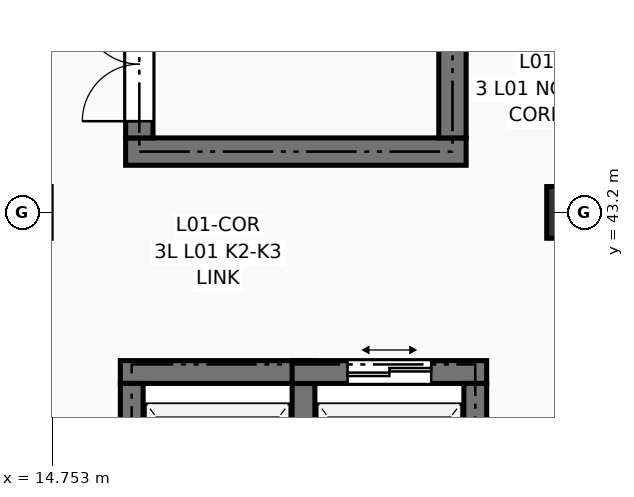
"""IFC4 building model, lengths in metres.
Left out: names, types, materials, properties, quantities, classifications, styles, units other than length and angle.
Written with IfcOpenShell. Run it as: python <this file> out.ifc"""

import sys

from ifc_helpers import new_model, si_unit, direction, frame, frame_2d, origin, origin_2d, place, context, subcontext, project, spatial, rectangle, extrude, element, fill, save


model = new_model("IFC4")
c1 = context("Model", 3, precision=1e-05, world=origin(), true_north=direction((0.0, 1.0)))
c2 = subcontext(c1, "Body", "Model", "MODEL_VIEW")
j1 = project(units=[si_unit("LENGTHUNIT", "METRE"), si_unit("PLANEANGLEUNIT", "RADIAN")], contexts=[c1])
p1 = place(None, origin())
s1 = spatial("IfcSite", under=j1, at=p1, CompositionType="ELEMENT")
p2 = place(p1, origin())
s2 = spatial("IfcBuilding", under=s1, at=p2, CompositionType="ELEMENT")
p3 = place(p2, frame((0.0, 0.0, 4.5)))
s3 = spatial("IfcBuildingStorey", under=s2, at=p3, CompositionType="ELEMENT", Elevation=4.5)
p4 = place(p3, frame((21.6, 43.2, 0.0), z_axis=(0.0, 0.0, 1.0), x_axis=(1.0, 0.0, 0.0)))
e1 = element("IfcColumn", 1, at=p4, inside=s3, PredefinedType="COLUMN", context=c2, shape_type="SweptSolid", body=[
    extrude(rectangle(XDim=0.68, YDim=0.68, at=origin_2d()), origin(), (0.0, 0.0, 1.0), 4.05),
])
p5 = place(p3, frame((15.72, 44.0, 0.0), z_axis=(0.0, 0.0, 1.0), x_axis=(1.0, 0.0, 0.0)))
e2 = element("IfcWall", 2, at=p5, inside=s3, PredefinedType="SHEAR", context=c2, shape_type="SweptSolid", body=[
    extrude(rectangle(XDim=4.48, YDim=0.36, at=frame_2d((2.24, 0.0))), origin(), (0.0, 0.0, 1.0), 3.79),
])
p6 = place(p3, frame((15.9, 44.18, 0.0), z_axis=(0.0, 0.0, 1.0), x_axis=(0.0, 1.0, 0.0)))
e3 = element("IfcWall", 3, at=p6, inside=s3, PredefinedType="SHEAR", context=c2, shape_type="SweptSolid", body=[
    extrude(rectangle(XDim=7.24, YDim=0.36, at=frame_2d((3.62, 0.0))), origin(), (0.0, 0.0, 1.0), 3.79),
])
p7 = place(p6, frame((0.22, 0.0, 0.0)))
e4 = element("IfcOpeningElement", 4, at=p7, cuts=e3, PredefinedType="OPENING", context=c2, shape_type="SweptSolid", body=[
    extrude(rectangle(XDim=1.5, YDim=2.2, at=frame_2d((0.75, 1.1))), frame((0.0, 0.192, 0.0), z_axis=(0.0, -1.0, 0.0), x_axis=(1.0, 0.0, 0.0)), (0.0, 0.0, 1.0), 0.384),
])
p8 = place(p3, frame((20.02, 44.18, 0.0), z_axis=(0.0, 0.0, 1.0), x_axis=(0.0, 1.0, 0.0)))
e5 = element("IfcWall", 5, at=p8, inside=s3, PredefinedType="SHEAR", context=c2, shape_type="SweptSolid", body=[
    extrude(rectangle(XDim=7.24, YDim=0.36, at=frame_2d((3.62, 0.0))), origin(), (0.0, 0.0, 1.0), 3.79),
])
p9 = place(p3, frame((15.65, 41.1, 0.0), z_axis=(0.0, 0.0, 1.0), x_axis=(1.0, 0.0, 0.0)))
e6 = element("IfcWall", 6, at=p9, inside=s3, PredefinedType="SHEAR", context=c2, shape_type="SweptSolid", body=[
    extrude(rectangle(XDim=2.56, YDim=0.3, at=frame_2d((1.28, 0.0))), origin(), (0.0, 0.0, 1.0), 3.79),
])
p10 = place(p3, frame((15.8, 37.98, 0.0), z_axis=(0.0, 0.0, 1.0), x_axis=(0.0, 1.0, 0.0)))
e7 = element("IfcWall", 7, at=p10, inside=s3, PredefinedType="SHEAR", context=c2, shape_type="SweptSolid", body=[
    extrude(rectangle(XDim=2.97, YDim=0.3, at=frame_2d((1.485, 0.0))), origin(), (0.0, 0.0, 1.0), 3.79),
])
p11 = place(p10, frame((0.935, 0.0, 0.0)))
e8 = element("IfcOpeningElement", 8, at=p11, cuts=e7, PredefinedType="OPENING", context=c2, shape_type="SweptSolid", body=[
    extrude(rectangle(XDim=1.1, YDim=2.2, at=frame_2d((0.55, 1.1))), frame((0.0, 0.162, 0.0), z_axis=(0.0, -1.0, 0.0), x_axis=(1.0, 0.0, 0.0)), (0.0, 0.0, 1.0), 0.324),
])
p12 = place(p3, frame((18.06, 37.98, 0.0), z_axis=(0.0, 0.0, 1.0), x_axis=(0.0, 1.0, 0.0)))
e9 = element("IfcWall", 9, at=p12, inside=s3, PredefinedType="SHEAR", context=c2, shape_type="SweptSolid", body=[
    extrude(rectangle(XDim=2.97, YDim=0.3, at=frame_2d((1.485, 0.0))), origin(), (0.0, 0.0, 1.0), 3.79),
])
p13 = place(p3, frame((17.91, 41.1, 0.0), z_axis=(0.0, 0.0, 1.0), x_axis=(1.0, 0.0, 0.0)))
e10 = element("IfcWall", 10, at=p13, inside=s3, PredefinedType="SHEAR", context=c2, shape_type="SweptSolid", body=[
    extrude(rectangle(XDim=2.56, YDim=0.3, at=frame_2d((1.28, 0.0))), origin(), (0.0, 0.0, 1.0), 3.79),
])
p14 = place(p13, frame((0.73, 0.0, 0.0)))
e11 = element("IfcOpeningElement", 11, at=p14, cuts=e10, PredefinedType="OPENING", context=c2, shape_type="SweptSolid", body=[
    extrude(rectangle(XDim=1.1, YDim=2.2, at=frame_2d((0.55, 1.1))), frame((0.0, 0.162, 0.0), z_axis=(0.0, -1.0, 0.0), x_axis=(1.0, 0.0, 0.0)), (0.0, 0.0, 1.0), 0.324),
])
p15 = place(p3, frame((20.32, 37.98, 0.0), z_axis=(0.0, 0.0, 1.0), x_axis=(0.0, 1.0, 0.0)))
e12 = element("IfcWall", 12, at=p15, inside=s3, PredefinedType="SHEAR", context=c2, shape_type="SweptSolid", body=[
    extrude(rectangle(XDim=2.97, YDim=0.3, at=frame_2d((1.485, 0.0))), origin(), (0.0, 0.0, 1.0), 3.79),
])
p16 = place(p7, origin())
e13 = element("IfcDoor", 13, at=p16, inside=s3, OperationType="DOUBLE_DOOR_SINGLE_SWING", PredefinedType="DOOR", context=c2, shape_type="SweptSolid", body=[
    extrude(rectangle(XDim=1.5, YDim=2.2, at=frame_2d((0.75, 1.1))), frame((0.0, 0.025, 0.0), z_axis=(0.0, -1.0, 0.0), x_axis=(1.0, 0.0, 0.0)), (0.0, 0.0, 1.0), 0.05),
])
fill(e4, e13)
p17 = place(p14, origin())
e14 = element("IfcDoor", 14, at=p17, inside=s3, OperationType="DOUBLE_DOOR_SLIDING", PredefinedType="DOOR", context=c2, shape_type="SweptSolid", body=[
    extrude(rectangle(XDim=1.1, YDim=2.2, at=frame_2d((0.55, 1.1))), frame((0.0, 0.025, 0.0), z_axis=(0.0, -1.0, 0.0), x_axis=(1.0, 0.0, 0.0)), (0.0, 0.0, 1.0), 0.05),
])
fill(e11, e14)
save(model, sys.argv[1])
